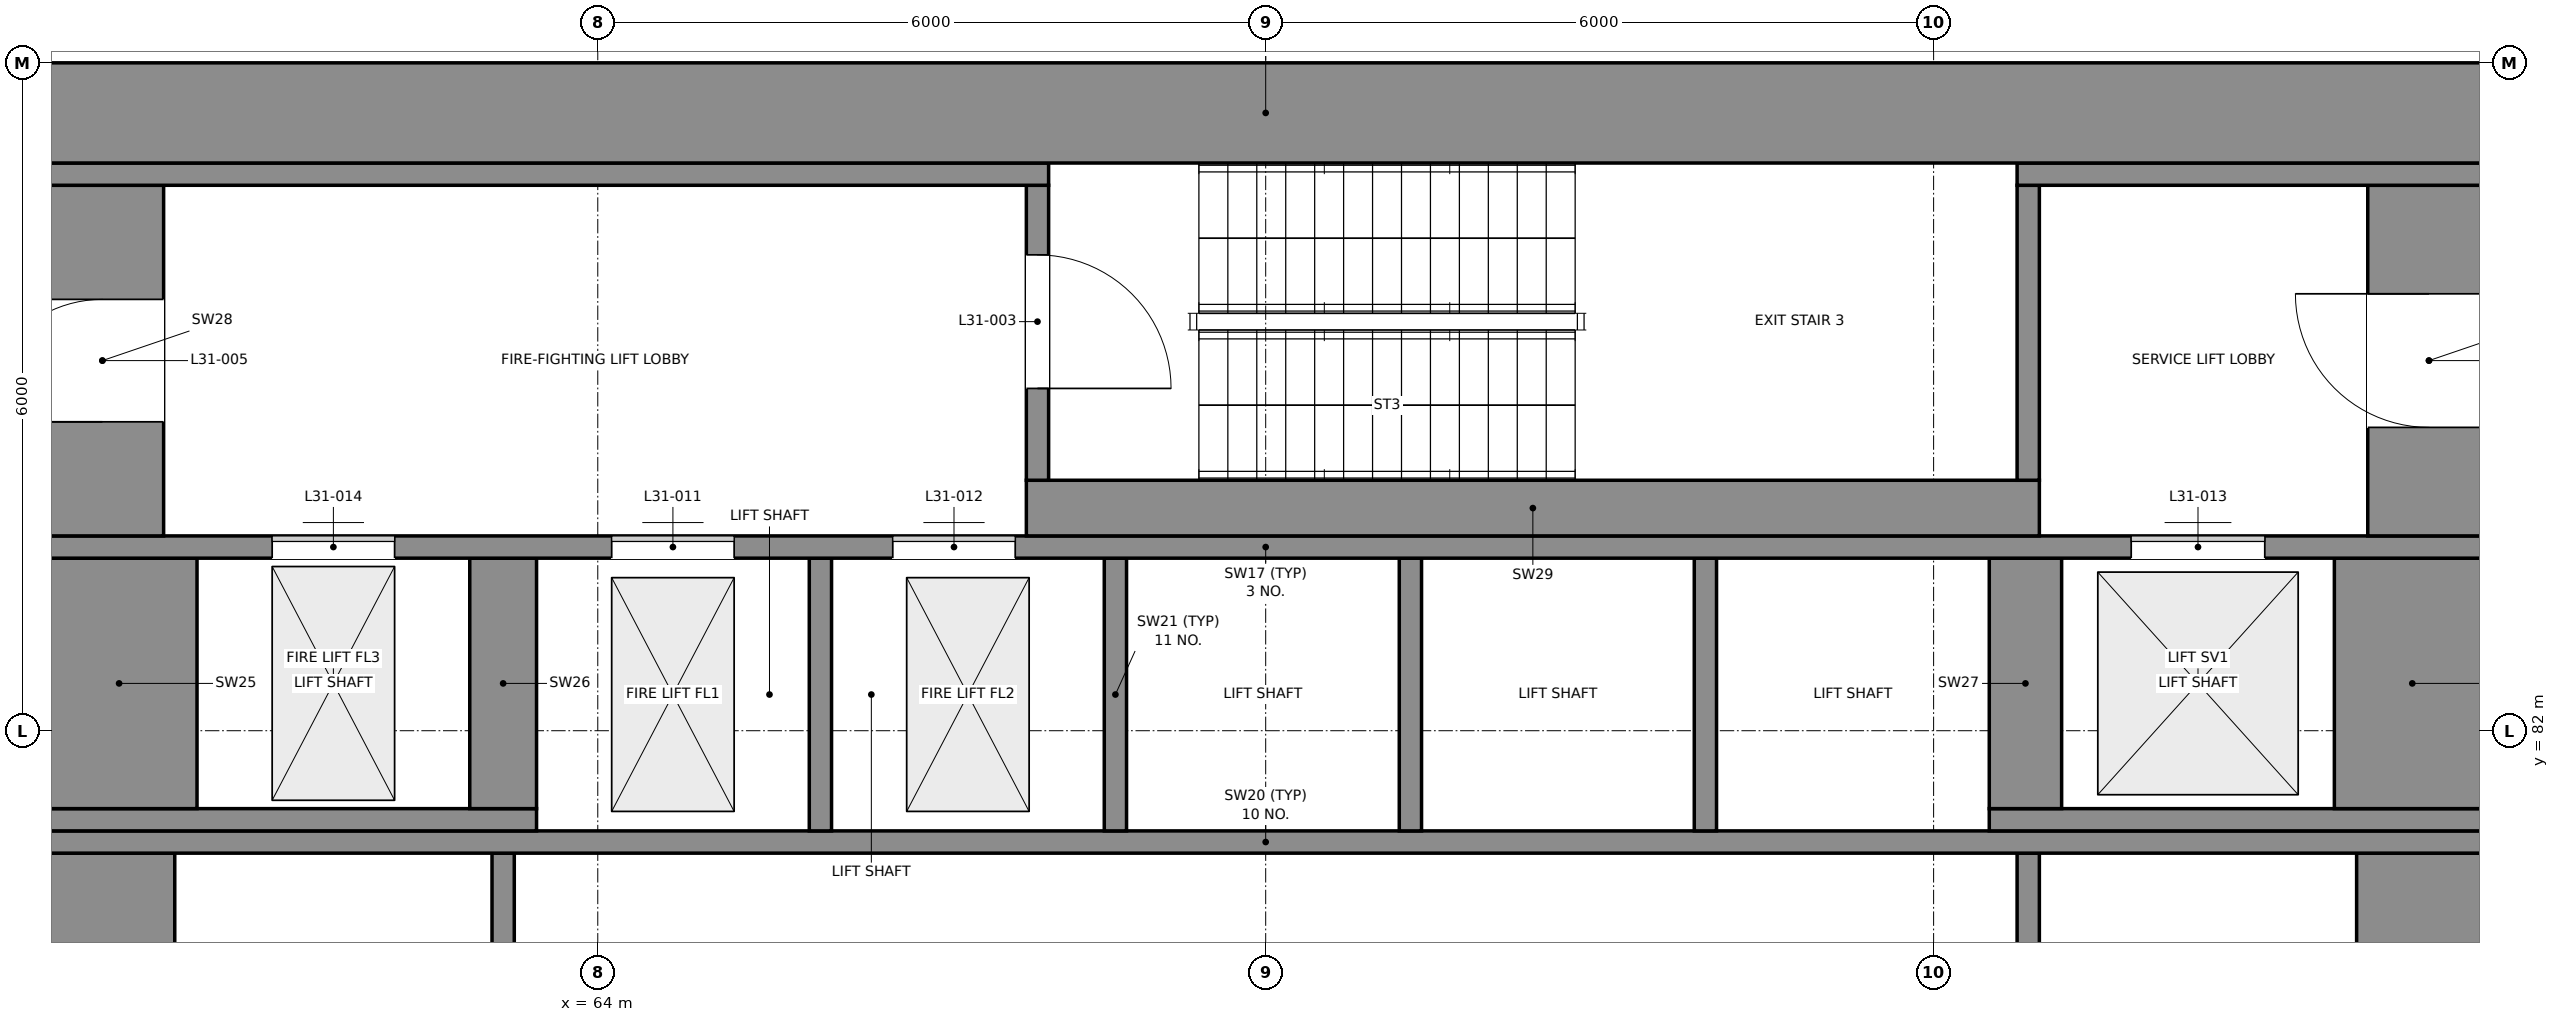
"""IFC4 building model, lengths in metres.
Left out: names, types, materials, properties, quantities, classifications, styles, units other than length and angle.
Written with IfcOpenShell. Run it as: python <this file> out.ifc"""

import sys

from ifc_helpers import new_model, si_unit, direction, frame, frame_2d, origin, place, context, subcontext, project, spatial, rectangle, extrude, element, fill, save


model = new_model("IFC4")
c1 = context("Model", 3, precision=1e-05, world=origin(), true_north=direction((0.0, 1.0)))
c2 = subcontext(c1, "Body", "Model", "MODEL_VIEW")
j1 = project(units=[si_unit("LENGTHUNIT", "METRE"), si_unit("PLANEANGLEUNIT", "RADIAN")], contexts=[c1])
p1 = place(None, origin())
s1 = spatial("IfcSite", under=j1, at=p1, CompositionType="ELEMENT")
p2 = place(p1, origin())
s2 = spatial("IfcBuilding", under=s1, at=p2, CompositionType="ELEMENT")
p3 = place(p2, frame((0.0, 0.0, 137.6)))
s3 = spatial("IfcBuildingStorey", under=s2, at=p3, CompositionType="ELEMENT", Elevation=137.6)
for number, where, z_axis, x_axis in (
    (1, (59.6, 72.1, 0.0), (0.0, 0.0, 1.0), (0.0, 1.0, 0.0)),
    (2, (80.4, 72.1, 0.0), (0.0, 0.0, 1.0), (0.0, 1.0, 0.0)),
):
    element("IfcWall", number, at=place(p3, frame(where, z_axis=z_axis, x_axis=x_axis)), inside=s3, PredefinedType="SHEAR", context=c2, shape_type="SweptSolid", body=[
        extrude(rectangle(XDim=8.8, YDim=1.2, at=frame_2d((4.4, 0.0))), origin(), (0.0, 0.0, 1.0), 5.0),
    ])
for number, where, z_axis, x_axis in (
    (3, (63.15, 77.7, 0.0), (0.0, 0.0, 1.0), (0.0, 1.0, 0.0)),
    (4, (76.85, 77.7, 0.0), (0.0, 0.0, 1.0), (0.0, 1.0, 0.0)),
):
    element("IfcWall", number, at=place(p3, frame(where, z_axis=z_axis, x_axis=x_axis)), inside=s3, PredefinedType="SHEAR", context=c2, shape_type="SweptSolid", body=[
        extrude(rectangle(XDim=3.2, YDim=0.2, at=frame_2d((1.6, 0.0))), origin(), (0.0, 0.0, 1.0), 5.0),
    ])
p4 = place(p3, frame((59.0, 81.0, 0.0), z_axis=(0.0, 0.0, 1.0), x_axis=(1.0, 0.0, 0.0)))
e5 = element("IfcWall", 5, at=p4, inside=s3, PredefinedType="SHEAR", context=c2, shape_type="SweptSolid", body=[
    extrude(rectangle(XDim=22.0, YDim=0.2, at=frame_2d((11.0, 0.0))), origin(), (0.0, 0.0, 1.0), 5.0),
])
p5 = place(p3, frame((59.0, 81.2, 0.0), z_axis=(0.0, 0.0, 1.0), x_axis=(1.0, 0.0, 0.0)))
e6 = element("IfcWall", 6, at=p5, inside=s3, PredefinedType="SHEAR", context=c2, shape_type="SweptSolid", body=[
    extrude(rectangle(XDim=4.45, YDim=0.2, at=frame_2d((2.225, 0.0))), origin(), (0.0, 0.0, 1.0), 5.0),
])
for number, where, z_axis, x_axis in (
    (7, (66.0, 81.1, 0.0), (0.0, 0.0, 1.0), (0.0, 1.0, 0.0)),
    (8, (68.65, 81.1, 0.0), (0.0, 0.0, 1.0), (0.0, 1.0, 0.0)),
    (9, (71.3, 81.1, 0.0), (0.0, 0.0, 1.0), (0.0, 1.0, 0.0)),
    (10, (73.95, 81.1, 0.0), (0.0, 0.0, 1.0), (0.0, 1.0, 0.0)),
):
    element("IfcWall", number, at=place(p3, frame(where, z_axis=z_axis, x_axis=x_axis)), inside=s3, PredefinedType="SHEAR", context=c2, shape_type="SweptSolid", body=[
        extrude(rectangle(XDim=2.45, YDim=0.2, at=frame_2d((1.225, 0.0))), origin(), (0.0, 0.0, 1.0), 5.0),
    ])
p6 = place(p3, frame((76.5, 81.2, 0.0), z_axis=(0.0, 0.0, 1.0), x_axis=(1.0, 0.0, 0.0)))
e11 = element("IfcWall", 11, at=p6, inside=s3, PredefinedType="SHEAR", context=c2, shape_type="SweptSolid", body=[
    extrude(rectangle(XDim=4.5, YDim=0.2, at=frame_2d((2.25, 0.0))), origin(), (0.0, 0.0, 1.0), 5.0),
])
p7 = place(p3, frame((59.7, 81.3, 0.0), z_axis=(0.0, 0.0, 1.0), x_axis=(0.0, 1.0, 0.0)))
e12 = element("IfcWall", 12, at=p7, inside=s3, PredefinedType="SHEAR", context=c2, shape_type="SweptSolid", body=[
    extrude(rectangle(XDim=2.25, YDim=1.4, at=frame_2d((1.125, 0.0))), origin(), (0.0, 0.0, 1.0), 5.0),
])
p8 = place(p3, frame((63.15, 81.3, 0.0), z_axis=(0.0, 0.0, 1.0), x_axis=(0.0, 1.0, 0.0)))
e13 = element("IfcWall", 13, at=p8, inside=s3, PredefinedType="SHEAR", context=c2, shape_type="SweptSolid", body=[
    extrude(rectangle(XDim=2.25, YDim=0.6, at=frame_2d((1.125, 0.0))), origin(), (0.0, 0.0, 1.0), 5.0),
])
p9 = place(p3, frame((76.825, 81.3, 0.0), z_axis=(0.0, 0.0, 1.0), x_axis=(0.0, 1.0, 0.0)))
e14 = element("IfcWall", 14, at=p9, inside=s3, PredefinedType="SHEAR", context=c2, shape_type="SweptSolid", body=[
    extrude(rectangle(XDim=2.25, YDim=0.65, at=frame_2d((1.125, 0.0))), origin(), (0.0, 0.0, 1.0), 5.0),
])
p10 = place(p3, frame((80.3, 81.3, 0.0), z_axis=(0.0, 0.0, 1.0), x_axis=(0.0, 1.0, 0.0)))
e15 = element("IfcWall", 15, at=p10, inside=s3, PredefinedType="SHEAR", context=c2, shape_type="SweptSolid", body=[
    extrude(rectangle(XDim=2.25, YDim=1.4, at=frame_2d((1.125, 0.0))), origin(), (0.0, 0.0, 1.0), 5.0),
])
p11 = place(p3, frame((59.0, 83.65, 0.0), z_axis=(0.0, 0.0, 1.0), x_axis=(1.0, 0.0, 0.0)))
e16 = element("IfcWall", 16, at=p11, inside=s3, PredefinedType="SHEAR", context=c2, shape_type="SweptSolid", body=[
    extrude(rectangle(XDim=22.0, YDim=0.2, at=frame_2d((11.0, 0.0))), origin(), (0.0, 0.0, 1.0), 5.0),
])
p12 = place(p11, frame((5.125, 0.0, 0.0)))
e17 = element("IfcOpeningElement", 17, at=p12, cuts=e16, PredefinedType="OPENING", context=c2, shape_type="SweptSolid", body=[
    extrude(rectangle(XDim=1.1, YDim=2.1, at=frame_2d((0.55, 1.05))), frame((0.0, 0.11, 0.0), z_axis=(0.0, -1.0, 0.0), x_axis=(1.0, 0.0, 0.0)), (0.0, 0.0, 1.0), 0.22),
])
p13 = place(p11, frame((7.65, 0.0, 0.0)))
e18 = element("IfcOpeningElement", 18, at=p13, cuts=e16, PredefinedType="OPENING", context=c2, shape_type="SweptSolid", body=[
    extrude(rectangle(XDim=1.1, YDim=2.1, at=frame_2d((0.55, 1.05))), frame((0.0, 0.11, 0.0), z_axis=(0.0, -1.0, 0.0), x_axis=(1.0, 0.0, 0.0)), (0.0, 0.0, 1.0), 0.22),
])
p14 = place(p11, frame((18.775, 0.0, 0.0)))
e19 = element("IfcOpeningElement", 19, at=p14, cuts=e16, PredefinedType="OPENING", context=c2, shape_type="SweptSolid", body=[
    extrude(rectangle(XDim=1.2, YDim=2.1, at=frame_2d((0.6, 1.05))), frame((0.0, 0.11, 0.0), z_axis=(0.0, -1.0, 0.0), x_axis=(1.0, 0.0, 0.0)), (0.0, 0.0, 1.0), 0.22),
])
p15 = place(p11, frame((2.075, 0.0, 0.0)))
e20 = element("IfcOpeningElement", 20, at=p15, cuts=e16, PredefinedType="OPENING", context=c2, shape_type="SweptSolid", body=[
    extrude(rectangle(XDim=1.1, YDim=2.1, at=frame_2d((0.55, 1.05))), frame((0.0, 0.11, 0.0), z_axis=(0.0, -1.0, 0.0), x_axis=(1.0, 0.0, 0.0)), (0.0, 0.0, 1.0), 0.22),
])
p16 = place(p3, frame((59.55, 83.75, 0.0), z_axis=(0.0, 0.0, 1.0), x_axis=(0.0, 1.0, 0.0)))
e21 = element("IfcWall", 21, at=p16, inside=s3, PredefinedType="SHEAR", context=c2, shape_type="SweptSolid", body=[
    extrude(rectangle(XDim=3.15, YDim=1.1, at=frame_2d((1.575, 0.0))), origin(), (0.0, 0.0, 1.0), 5.0),
])
p17 = place(p16, frame((1.025, 0.0, 0.0)))
e22 = element("IfcOpeningElement", 22, at=p17, cuts=e21, PredefinedType="OPENING", context=c2, shape_type="SweptSolid", body=[
    extrude(rectangle(XDim=1.1, YDim=2.1, at=frame_2d((0.55, 1.05))), frame((0.0, 0.56, 0.0), z_axis=(0.0, -1.0, 0.0), x_axis=(1.0, 0.0, 0.0)), (0.0, 0.0, 1.0), 1.12),
])
p18 = place(p3, frame((67.85, 84.0, 0.0), z_axis=(0.0, 0.0, 1.0), x_axis=(1.0, 0.0, 0.0)))
e23 = element("IfcWall", 23, at=p18, inside=s3, PredefinedType="SHEAR", context=c2, shape_type="SweptSolid", body=[
    extrude(rectangle(XDim=9.1, YDim=0.5, at=frame_2d((4.55, 0.0))), origin(), (0.0, 0.0, 1.0), 5.0),
])
p19 = place(p3, frame((80.45, 83.75, 0.0), z_axis=(0.0, 0.0, 1.0), x_axis=(0.0, 1.0, 0.0)))
e24 = element("IfcWall", 24, at=p19, inside=s3, PredefinedType="SHEAR", context=c2, shape_type="SweptSolid", body=[
    extrude(rectangle(XDim=3.15, YDim=1.1, at=frame_2d((1.575, 0.0))), origin(), (0.0, 0.0, 1.0), 5.0),
])
p20 = place(p19, frame((0.975, 0.0, 0.0)))
e25 = element("IfcOpeningElement", 25, at=p20, cuts=e24, PredefinedType="OPENING", context=c2, shape_type="SweptSolid", body=[
    extrude(rectangle(XDim=1.2, YDim=2.1, at=frame_2d((0.6, 1.05))), frame((0.0, 0.56, 0.0), z_axis=(0.0, -1.0, 0.0), x_axis=(1.0, 0.0, 0.0)), (0.0, 0.0, 1.0), 1.12),
])
p21 = place(p3, frame((67.95, 84.25, 0.0), z_axis=(0.0, 0.0, 1.0), x_axis=(0.0, 1.0, 0.0)))
e26 = element("IfcWall", 26, at=p21, inside=s3, PredefinedType="SHEAR", context=c2, shape_type="SweptSolid", body=[
    extrude(rectangle(XDim=2.65, YDim=0.2, at=frame_2d((1.325, 0.0))), origin(), (0.0, 0.0, 1.0), 5.0),
])
p22 = place(p21, frame((0.825, 0.0, 0.0)))
e27 = element("IfcOpeningElement", 27, at=p22, cuts=e26, PredefinedType="OPENING", context=c2, shape_type="SweptSolid", body=[
    extrude(rectangle(XDim=1.2, YDim=2.1, at=frame_2d((0.6, 1.05))), frame((0.0, 0.11, 0.0), z_axis=(0.0, -1.0, 0.0), x_axis=(1.0, 0.0, 0.0)), (0.0, 0.0, 1.0), 0.22),
])
p23 = place(p3, frame((76.85, 84.25, 0.0), z_axis=(0.0, 0.0, 1.0), x_axis=(0.0, 1.0, 0.0)))
e28 = element("IfcWall", 28, at=p23, inside=s3, PredefinedType="SHEAR", context=c2, shape_type="SweptSolid", body=[
    extrude(rectangle(XDim=2.65, YDim=0.2, at=frame_2d((1.325, 0.0))), origin(), (0.0, 0.0, 1.0), 5.0),
])
p24 = place(p3, frame((59.0, 87.0, 0.0), z_axis=(0.0, 0.0, 1.0), x_axis=(1.0, 0.0, 0.0)))
e29 = element("IfcWall", 29, at=p24, inside=s3, PredefinedType="SHEAR", context=c2, shape_type="SweptSolid", body=[
    extrude(rectangle(XDim=9.05, YDim=0.2, at=frame_2d((4.525, 0.0))), origin(), (0.0, 0.0, 1.0), 5.0),
])
p25 = place(p3, frame((76.75, 87.0, 0.0), z_axis=(0.0, 0.0, 1.0), x_axis=(1.0, 0.0, 0.0)))
e30 = element("IfcWall", 30, at=p25, inside=s3, PredefinedType="SHEAR", context=c2, shape_type="SweptSolid", body=[
    extrude(rectangle(XDim=4.25, YDim=0.2, at=frame_2d((2.125, 0.0))), origin(), (0.0, 0.0, 1.0), 5.0),
])
p26 = place(p3, frame((59.0, 87.55, 0.0), z_axis=(0.0, 0.0, 1.0), x_axis=(1.0, 0.0, 0.0)))
e31 = element("IfcWall", 31, at=p26, inside=s3, PredefinedType="SHEAR", context=c2, shape_type="SweptSolid", body=[
    extrude(rectangle(XDim=22.0, YDim=0.9, at=frame_2d((11.0, 0.0))), origin(), (0.0, 0.0, 1.0), 5.0),
])
p27 = place(p22, frame((1.2, 0.0, 0.0), z_axis=(0.0, 0.0, 1.0), x_axis=(-1.0, 0.0, 0.0)))
e32 = element("IfcDoor", 32, at=p27, inside=s3, OperationType="SINGLE_SWING_RIGHT", PredefinedType="DOOR", context=c2, shape_type="SweptSolid", body=[
    extrude(rectangle(XDim=1.2, YDim=2.1, at=frame_2d((0.6, 1.05))), frame((0.0, 0.025, 0.0), z_axis=(0.0, -1.0, 0.0), x_axis=(1.0, 0.0, 0.0)), (0.0, 0.0, 1.0), 0.05),
])
fill(e27, e32)
p28 = place(p17, origin())
e33 = element("IfcDoor", 33, at=p28, inside=s3, OperationType="SINGLE_SWING_LEFT", PredefinedType="DOOR", context=c2, shape_type="SweptSolid", body=[
    extrude(rectangle(XDim=1.1, YDim=2.1, at=frame_2d((0.55, 1.05))), frame((0.0, 0.025, 0.0), z_axis=(0.0, -1.0, 0.0), x_axis=(1.0, 0.0, 0.0)), (0.0, 0.0, 1.0), 0.05),
])
fill(e22, e33)
p29 = place(p20, origin())
e34 = element("IfcDoor", 34, at=p29, inside=s3, OperationType="SINGLE_SWING_RIGHT", PredefinedType="DOOR", context=c2, shape_type="SweptSolid", body=[
    extrude(rectangle(XDim=1.2, YDim=2.1, at=frame_2d((0.6, 1.05))), frame((0.0, 0.025, 0.0), z_axis=(0.0, -1.0, 0.0), x_axis=(1.0, 0.0, 0.0)), (0.0, 0.0, 1.0), 0.05),
])
fill(e25, e34)
p30 = place(p12, origin())
e35 = element("IfcDoor", 35, at=p30, inside=s3, OperationType="DOUBLE_DOOR_SLIDING", PredefinedType="DOOR", context=c2, shape_type="SweptSolid", body=[
    extrude(rectangle(XDim=1.1, YDim=2.1, at=frame_2d((0.55, 1.05))), frame((0.0, 0.025, 0.0), z_axis=(0.0, -1.0, 0.0), x_axis=(1.0, 0.0, 0.0)), (0.0, 0.0, 1.0), 0.05),
])
fill(e17, e35)
p31 = place(p13, origin())
e36 = element("IfcDoor", 36, at=p31, inside=s3, OperationType="DOUBLE_DOOR_SLIDING", PredefinedType="DOOR", context=c2, shape_type="SweptSolid", body=[
    extrude(rectangle(XDim=1.1, YDim=2.1, at=frame_2d((0.55, 1.05))), frame((0.0, 0.025, 0.0), z_axis=(0.0, -1.0, 0.0), x_axis=(1.0, 0.0, 0.0)), (0.0, 0.0, 1.0), 0.05),
])
fill(e18, e36)
p32 = place(p14, origin())
e37 = element("IfcDoor", 37, at=p32, inside=s3, OperationType="DOUBLE_DOOR_SLIDING", PredefinedType="DOOR", context=c2, shape_type="SweptSolid", body=[
    extrude(rectangle(XDim=1.2, YDim=2.1, at=frame_2d((0.6, 1.05))), frame((0.0, 0.025, 0.0), z_axis=(0.0, -1.0, 0.0), x_axis=(1.0, 0.0, 0.0)), (0.0, 0.0, 1.0), 0.05),
])
fill(e19, e37)
p33 = place(p15, origin())
e38 = element("IfcDoor", 38, at=p33, inside=s3, OperationType="DOUBLE_DOOR_SLIDING", PredefinedType="DOOR", context=c2, shape_type="SweptSolid", body=[
    extrude(rectangle(XDim=1.1, YDim=2.1, at=frame_2d((0.55, 1.05))), frame((0.0, 0.025, 0.0), z_axis=(0.0, -1.0, 0.0), x_axis=(1.0, 0.0, 0.0)), (0.0, 0.0, 1.0), 0.05),
])
fill(e20, e38)
save(model, sys.argv[1])
